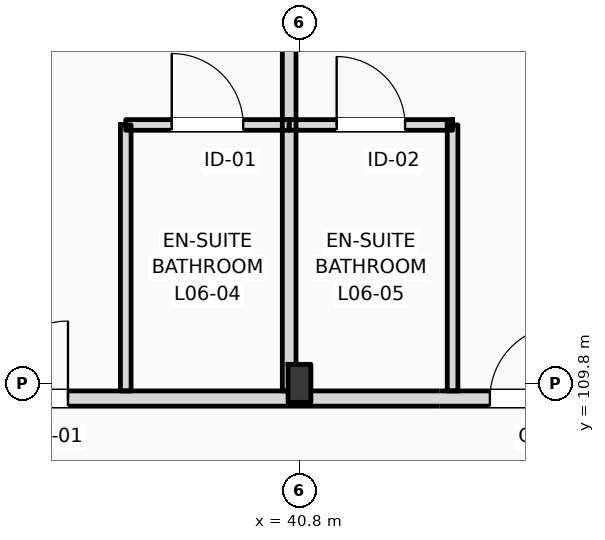
"""IFC4 building model, lengths in metres.
Left out: names, types, materials, properties, quantities, classifications, styles, units other than length and angle.
Written with IfcOpenShell. Run it as: python <this file> out.ifc"""

import sys

from ifc_helpers import new_model, si_unit, direction, frame, frame_2d, origin, origin_2d, place, context, subcontext, project, spatial, rectangle, i_section, extrude, element, fill, save


model = new_model("IFC4")
c1 = context("Model", 3, precision=1e-05, world=origin(), true_north=direction((0.0, 1.0)))
c2 = subcontext(c1, "Body", "Model", "MODEL_VIEW")
j1 = project(units=[si_unit("LENGTHUNIT", "METRE"), si_unit("PLANEANGLEUNIT", "RADIAN")], contexts=[c1])
p1 = place(None, origin())
s1 = spatial("IfcSite", under=j1, at=p1, CompositionType="ELEMENT")
p2 = place(p1, origin())
s2 = spatial("IfcBuilding", under=s1, at=p2, CompositionType="ELEMENT")
p3 = place(p2, frame((0.0, 0.0, 28.2)))
s3 = spatial("IfcBuildingStorey", under=s2, at=p3, CompositionType="ELEMENT", Elevation=28.2)
p4 = place(p3, frame((40.8, 109.8, 0.0), z_axis=(0.0, 0.0, 1.0), x_axis=(1.0, 0.0, 0.0)))
e1 = element("IfcColumn", 1, at=p4, inside=s3, PredefinedType="COLUMN", context=c2, shape_type="SweptSolid", body=[
    extrude(i_section(OverallWidth=0.3, OverallDepth=0.5, WebThickness=0.014, FlangeThickness=0.028, FilletRadius=0.027, at=origin_2d()), origin(), (0.0, 0.0, 1.0), 3.6),
])
p5 = place(p3, frame((10.65, 109.6, 0.0), z_axis=(0.0, 0.0, 1.0), x_axis=(1.0, 0.0, 0.0)))
e2 = element("IfcWall", 2, at=p5, inside=s3, PredefinedType="PARTITIONING", context=c2, shape_type="SweptSolid", body=[
    extrude(rectangle(XDim=109.21, YDim=0.2, at=frame_2d((54.605, 0.0))), origin(), (0.0, 0.0, 1.0), 2.8),
])
p6 = place(p5, frame((12.611, 0.0, 0.0)))
e3 = element("IfcOpeningElement", 3, at=p6, cuts=e2, PredefinedType="OPENING", context=c2, shape_type="SweptSolid", body=[
    extrude(rectangle(XDim=1.02, YDim=2.2, at=frame_2d((0.51, 1.1))), frame((0.0, 0.11, 0.0), z_axis=(0.0, -1.0, 0.0), x_axis=(1.0, 0.0, 0.0)), (0.0, 0.0, 1.0), 0.22),
])
p7 = place(p5, frame((19.451, 0.0, 0.0)))
e4 = element("IfcOpeningElement", 4, at=p7, cuts=e2, PredefinedType="OPENING", context=c2, shape_type="SweptSolid", body=[
    extrude(rectangle(XDim=1.02, YDim=2.2, at=frame_2d((0.51, 1.1))), frame((0.0, 0.11, 0.0), z_axis=(0.0, -1.0, 0.0), x_axis=(1.0, 0.0, 0.0)), (0.0, 0.0, 1.0), 0.22),
])
p8 = place(p5, frame((23.842, 0.0, 0.0)))
e5 = element("IfcOpeningElement", 5, at=p8, cuts=e2, PredefinedType="OPENING", context=c2, shape_type="SweptSolid", body=[
    extrude(rectangle(XDim=1.02, YDim=2.2, at=frame_2d((0.51, 1.1))), frame((0.0, 0.11, 0.0), z_axis=(0.0, -1.0, 0.0), x_axis=(1.0, 0.0, 0.0)), (0.0, 0.0, 1.0), 0.22),
])
p9 = place(p5, frame((26.084, 0.0, 0.0)))
e6 = element("IfcOpeningElement", 6, at=p9, cuts=e2, PredefinedType="OPENING", context=c2, shape_type="SweptSolid", body=[
    extrude(rectangle(XDim=1.02, YDim=2.2, at=frame_2d((0.51, 1.1))), frame((0.0, 0.11, 0.0), z_axis=(0.0, -1.0, 0.0), x_axis=(1.0, 0.0, 0.0)), (0.0, 0.0, 1.0), 0.22),
])
p10 = place(p5, frame((32.655, 0.0, 0.0)))
e7 = element("IfcOpeningElement", 7, at=p10, cuts=e2, PredefinedType="OPENING", context=c2, shape_type="SweptSolid", body=[
    extrude(rectangle(XDim=0.96, YDim=2.2, at=frame_2d((0.48, 1.1))), frame((0.0, 0.11, 0.0), z_axis=(0.0, -1.0, 0.0), x_axis=(1.0, 0.0, 0.0)), (0.0, 0.0, 1.0), 0.22),
])
p11 = place(p5, frame((34.895, 0.0, 0.0)))
e8 = element("IfcOpeningElement", 8, at=p11, cuts=e2, PredefinedType="OPENING", context=c2, shape_type="SweptSolid", body=[
    extrude(rectangle(XDim=0.96, YDim=2.2, at=frame_2d((0.48, 1.1))), frame((0.0, 0.11, 0.0), z_axis=(0.0, -1.0, 0.0), x_axis=(1.0, 0.0, 0.0)), (0.0, 0.0, 1.0), 0.22),
])
p12 = place(p5, frame((41.436, 0.0, 0.0)))
e9 = element("IfcOpeningElement", 9, at=p12, cuts=e2, PredefinedType="OPENING", context=c2, shape_type="SweptSolid", body=[
    extrude(rectangle(XDim=0.96, YDim=2.2, at=frame_2d((0.48, 1.1))), frame((0.0, 0.11, 0.0), z_axis=(0.0, -1.0, 0.0), x_axis=(1.0, 0.0, 0.0)), (0.0, 0.0, 1.0), 0.22),
])
p13 = place(p5, frame((43.427, 0.0, 0.0)))
e10 = element("IfcOpeningElement", 10, at=p13, cuts=e2, PredefinedType="OPENING", context=c2, shape_type="SweptSolid", body=[
    extrude(rectangle(XDim=0.96, YDim=2.2, at=frame_2d((0.48, 1.1))), frame((0.0, 0.11, 0.0), z_axis=(0.0, -1.0, 0.0), x_axis=(1.0, 0.0, 0.0)), (0.0, 0.0, 1.0), 0.22),
])
p14 = place(p5, frame((50.218, 0.0, 0.0)))
e11 = element("IfcOpeningElement", 11, at=p14, cuts=e2, PredefinedType="OPENING", context=c2, shape_type="SweptSolid", body=[
    extrude(rectangle(XDim=0.96, YDim=2.2, at=frame_2d((0.48, 1.1))), frame((0.0, 0.11, 0.0), z_axis=(0.0, -1.0, 0.0), x_axis=(1.0, 0.0, 0.0)), (0.0, 0.0, 1.0), 0.22),
])
p15 = place(p5, frame((54.859, 0.0, 0.0)))
e12 = element("IfcOpeningElement", 12, at=p15, cuts=e2, PredefinedType="OPENING", context=c2, shape_type="SweptSolid", body=[
    extrude(rectangle(XDim=0.96, YDim=2.2, at=frame_2d((0.48, 1.1))), frame((0.0, 0.11, 0.0), z_axis=(0.0, -1.0, 0.0), x_axis=(1.0, 0.0, 0.0)), (0.0, 0.0, 1.0), 0.22),
])
p16 = place(p5, frame((59.0, 0.0, 0.0)))
e13 = element("IfcOpeningElement", 13, at=p16, cuts=e2, PredefinedType="OPENING", context=c2, shape_type="SweptSolid", body=[
    extrude(rectangle(XDim=0.96, YDim=2.2, at=frame_2d((0.48, 1.1))), frame((0.0, 0.11, 0.0), z_axis=(0.0, -1.0, 0.0), x_axis=(1.0, 0.0, 0.0)), (0.0, 0.0, 1.0), 0.22),
])
p17 = place(p5, frame((63.39, 0.0, 0.0)))
e14 = element("IfcOpeningElement", 14, at=p17, cuts=e2, PredefinedType="OPENING", context=c2, shape_type="SweptSolid", body=[
    extrude(rectangle(XDim=0.96, YDim=2.2, at=frame_2d((0.48, 1.1))), frame((0.0, 0.11, 0.0), z_axis=(0.0, -1.0, 0.0), x_axis=(1.0, 0.0, 0.0)), (0.0, 0.0, 1.0), 0.22),
])
p18 = place(p5, frame((65.631, 0.0, 0.0)))
e15 = element("IfcOpeningElement", 15, at=p18, cuts=e2, PredefinedType="OPENING", context=c2, shape_type="SweptSolid", body=[
    extrude(rectangle(XDim=0.96, YDim=2.2, at=frame_2d((0.48, 1.1))), frame((0.0, 0.11, 0.0), z_axis=(0.0, -1.0, 0.0), x_axis=(1.0, 0.0, 0.0)), (0.0, 0.0, 1.0), 0.22),
])
p19 = place(p5, frame((72.172, 0.0, 0.0)))
e16 = element("IfcOpeningElement", 16, at=p19, cuts=e2, PredefinedType="OPENING", context=c2, shape_type="SweptSolid", body=[
    extrude(rectangle(XDim=0.96, YDim=2.2, at=frame_2d((0.48, 1.1))), frame((0.0, 0.11, 0.0), z_axis=(0.0, -1.0, 0.0), x_axis=(1.0, 0.0, 0.0)), (0.0, 0.0, 1.0), 0.22),
])
p20 = place(p5, frame((74.413, 0.0, 0.0)))
e17 = element("IfcOpeningElement", 17, at=p20, cuts=e2, PredefinedType="OPENING", context=c2, shape_type="SweptSolid", body=[
    extrude(rectangle(XDim=0.96, YDim=2.2, at=frame_2d((0.48, 1.1))), frame((0.0, 0.11, 0.0), z_axis=(0.0, -1.0, 0.0), x_axis=(1.0, 0.0, 0.0)), (0.0, 0.0, 1.0), 0.22),
])
p21 = place(p5, frame((80.954, 0.0, 0.0)))
e18 = element("IfcOpeningElement", 18, at=p21, cuts=e2, PredefinedType="OPENING", context=c2, shape_type="SweptSolid", body=[
    extrude(rectangle(XDim=0.96, YDim=2.2, at=frame_2d((0.48, 1.1))), frame((0.0, 0.11, 0.0), z_axis=(0.0, -1.0, 0.0), x_axis=(1.0, 0.0, 0.0)), (0.0, 0.0, 1.0), 0.22),
])
p22 = place(p5, frame((83.195, 0.0, 0.0)))
e19 = element("IfcOpeningElement", 19, at=p22, cuts=e2, PredefinedType="OPENING", context=c2, shape_type="SweptSolid", body=[
    extrude(rectangle(XDim=0.96, YDim=2.2, at=frame_2d((0.48, 1.1))), frame((0.0, 0.11, 0.0), z_axis=(0.0, -1.0, 0.0), x_axis=(1.0, 0.0, 0.0)), (0.0, 0.0, 1.0), 0.22),
])
p23 = place(p5, frame((89.735, 0.0, 0.0)))
e20 = element("IfcOpeningElement", 20, at=p23, cuts=e2, PredefinedType="OPENING", context=c2, shape_type="SweptSolid", body=[
    extrude(rectangle(XDim=0.96, YDim=2.2, at=frame_2d((0.48, 1.1))), frame((0.0, 0.11, 0.0), z_axis=(0.0, -1.0, 0.0), x_axis=(1.0, 0.0, 0.0)), (0.0, 0.0, 1.0), 0.22),
])
p24 = place(p5, frame((94.126, 0.0, 0.0)))
e21 = element("IfcOpeningElement", 21, at=p24, cuts=e2, PredefinedType="OPENING", context=c2, shape_type="SweptSolid", body=[
    extrude(rectangle(XDim=0.96, YDim=2.2, at=frame_2d((0.48, 1.1))), frame((0.0, 0.11, 0.0), z_axis=(0.0, -1.0, 0.0), x_axis=(1.0, 0.0, 0.0)), (0.0, 0.0, 1.0), 0.22),
])
p25 = place(p5, frame((98.517, 0.0, 0.0)))
e22 = element("IfcOpeningElement", 22, at=p25, cuts=e2, PredefinedType="OPENING", context=c2, shape_type="SweptSolid", body=[
    extrude(rectangle(XDim=0.96, YDim=2.2, at=frame_2d((0.48, 1.1))), frame((0.0, 0.11, 0.0), z_axis=(0.0, -1.0, 0.0), x_axis=(1.0, 0.0, 0.0)), (0.0, 0.0, 1.0), 0.22),
])
p26 = place(p5, frame((102.908, 0.0, 0.0)))
e23 = element("IfcOpeningElement", 23, at=p26, cuts=e2, PredefinedType="OPENING", context=c2, shape_type="SweptSolid", body=[
    extrude(rectangle(XDim=0.96, YDim=2.2, at=frame_2d((0.48, 1.1))), frame((0.0, 0.11, 0.0), z_axis=(0.0, -1.0, 0.0), x_axis=(1.0, 0.0, 0.0)), (0.0, 0.0, 1.0), 0.22),
])
p27 = place(p5, frame((105.099, 0.0, 0.0)))
e24 = element("IfcOpeningElement", 24, at=p27, cuts=e2, PredefinedType="OPENING", context=c2, shape_type="SweptSolid", body=[
    extrude(rectangle(XDim=0.96, YDim=2.2, at=frame_2d((0.48, 1.1))), frame((0.0, 0.11, 0.0), z_axis=(0.0, -1.0, 0.0), x_axis=(1.0, 0.0, 0.0)), (0.0, 0.0, 1.0), 0.22),
])
p28 = place(p5, frame((2.716, 0.0, 0.0)))
e25 = element("IfcOpeningElement", 25, at=p28, cuts=e2, PredefinedType="OPENING", context=c2, shape_type="SweptSolid", body=[
    extrude(rectangle(XDim=1.35, YDim=2.25, at=frame_2d((0.675, 1.125))), frame((0.0, 0.11, 0.0), z_axis=(0.0, -1.0, 0.0), x_axis=(1.0, 0.0, 0.0)), (0.0, 0.0, 1.0), 0.22),
])
p29 = place(p5, frame((6.65, 0.0, 0.0)))
e26 = element("IfcOpeningElement", 26, at=p29, cuts=e2, PredefinedType="OPENING", context=c2, shape_type="SweptSolid", body=[
    extrude(rectangle(XDim=1.35, YDim=2.25, at=frame_2d((0.675, 1.125))), frame((0.0, 0.11, 0.0), z_axis=(0.0, -1.0, 0.0), x_axis=(1.0, 0.0, 0.0)), (0.0, 0.0, 1.0), 0.22),
])
p30 = place(p5, frame((10.583, 0.0, 0.0)))
e27 = element("IfcOpeningElement", 27, at=p30, cuts=e2, PredefinedType="OPENING", context=c2, shape_type="SweptSolid", body=[
    extrude(rectangle(XDim=1.35, YDim=2.25, at=frame_2d((0.675, 1.125))), frame((0.0, 0.11, 0.0), z_axis=(0.0, -1.0, 0.0), x_axis=(1.0, 0.0, 0.0)), (0.0, 0.0, 1.0), 0.22),
])
p31 = place(p3, frame((40.664, 109.7, 0.0), z_axis=(0.0, 0.0, 1.0), x_axis=(0.0, 1.0, 0.0)))
e28 = element("IfcWall", 28, at=p31, inside=s3, PredefinedType="PARTITIONING", context=c2, shape_type="SweptSolid", body=[
    extrude(rectangle(XDim=8.15, YDim=0.18, at=frame_2d((4.075, 0.0))), origin(), (0.0, 0.0, 1.0), 2.99),
])
p32 = place(p3, frame((38.514, 109.7, 0.0), z_axis=(0.0, 0.0, 1.0), x_axis=(0.0, 1.0, 0.0)))
e29 = element("IfcWall", 29, at=p32, inside=s3, PredefinedType="PARTITIONING", context=c2, shape_type="SweptSolid", body=[
    extrude(rectangle(XDim=3.5, YDim=0.14, at=frame_2d((1.75, 0.0))), origin(), (0.0, 0.0, 1.0), 3.36),
])
p33 = place(p3, frame((38.514, 113.2, 0.0), z_axis=(0.0, 0.0, 1.0), x_axis=(1.0, 0.0, 0.0)))
e30 = element("IfcWall", 30, at=p33, inside=s3, PredefinedType="PARTITIONING", context=c2, shape_type="SweptSolid", body=[
    extrude(rectangle(XDim=2.15, YDim=0.14, at=frame_2d((1.075, 0.0))), origin(), (0.0, 0.0, 1.0), 3.36),
])
p34 = place(p33, frame((0.605, 0.0, 0.0)))
e31 = element("IfcOpeningElement", 31, at=p34, cuts=e30, PredefinedType="OPENING", context=c2, shape_type="SweptSolid", body=[
    extrude(rectangle(XDim=0.94, YDim=2.15, at=frame_2d((0.47, 1.075))), frame((0.0, 0.08, 0.0), z_axis=(0.0, -1.0, 0.0), x_axis=(1.0, 0.0, 0.0)), (0.0, 0.0, 1.0), 0.16),
])
p35 = place(p3, frame((42.814, 109.7, 0.0), z_axis=(0.0, 0.0, 1.0), x_axis=(0.0, 1.0, 0.0)))
e32 = element("IfcWall", 32, at=p35, inside=s3, PredefinedType="PARTITIONING", context=c2, shape_type="SweptSolid", body=[
    extrude(rectangle(XDim=3.5, YDim=0.14, at=frame_2d((1.75, 0.0))), origin(), (0.0, 0.0, 1.0), 3.36),
])
p36 = place(p3, frame((40.664, 113.2, 0.0), z_axis=(0.0, 0.0, 1.0), x_axis=(1.0, 0.0, 0.0)))
e33 = element("IfcWall", 33, at=p36, inside=s3, PredefinedType="PARTITIONING", context=c2, shape_type="SweptSolid", body=[
    extrude(rectangle(XDim=2.15, YDim=0.14, at=frame_2d((1.075, 0.0))), origin(), (0.0, 0.0, 1.0), 3.36),
])
p37 = place(p36, frame((0.625, 0.0, 0.0)))
e34 = element("IfcOpeningElement", 34, at=p37, cuts=e33, PredefinedType="OPENING", context=c2, shape_type="SweptSolid", body=[
    extrude(rectangle(XDim=0.9, YDim=2.1, at=frame_2d((0.45, 1.05))), frame((0.0, 0.08, 0.0), z_axis=(0.0, -1.0, 0.0), x_axis=(1.0, 0.0, 0.0)), (0.0, 0.0, 1.0), 0.16),
])
p38 = place(p9, origin())
e35 = element("IfcDoor", 35, at=p38, inside=s3, OperationType="SINGLE_SWING_RIGHT", PredefinedType="DOOR", context=c2, shape_type="SweptSolid", body=[
    extrude(rectangle(XDim=1.02, YDim=2.2, at=frame_2d((0.51, 1.1))), frame((0.0, 0.025, 0.0), z_axis=(0.0, -1.0, 0.0), x_axis=(1.0, 0.0, 0.0)), (0.0, 0.0, 1.0), 0.05),
])
fill(e6, e35)
p39 = place(p34, origin())
e36 = element("IfcDoor", 36, at=p39, inside=s3, OperationType="SINGLE_SWING_LEFT", PredefinedType="DOOR", context=c2, shape_type="SweptSolid", body=[
    extrude(rectangle(XDim=0.94, YDim=2.15, at=frame_2d((0.47, 1.075))), frame((0.0, 0.025, 0.0), z_axis=(0.0, -1.0, 0.0), x_axis=(1.0, 0.0, 0.0)), (0.0, 0.0, 1.0), 0.05),
])
fill(e31, e36)
p40 = place(p10, origin())
e37 = element("IfcDoor", 37, at=p40, inside=s3, OperationType="SINGLE_SWING_RIGHT", PredefinedType="DOOR", context=c2, shape_type="SweptSolid", body=[
    extrude(rectangle(XDim=0.96, YDim=2.2, at=frame_2d((0.48, 1.1))), frame((0.0, 0.025, 0.0), z_axis=(0.0, -1.0, 0.0), x_axis=(1.0, 0.0, 0.0)), (0.0, 0.0, 1.0), 0.05),
])
fill(e7, e37)
p41 = place(p37, origin())
e38 = element("IfcDoor", 38, at=p41, inside=s3, OperationType="SINGLE_SWING_LEFT", PredefinedType="DOOR", context=c2, shape_type="SweptSolid", body=[
    extrude(rectangle(XDim=0.9, YDim=2.1, at=frame_2d((0.45, 1.05))), frame((0.0, 0.025, 0.0), z_axis=(0.0, -1.0, 0.0), x_axis=(1.0, 0.0, 0.0)), (0.0, 0.0, 1.0), 0.05),
])
fill(e34, e38)
save(model, sys.argv[1])
